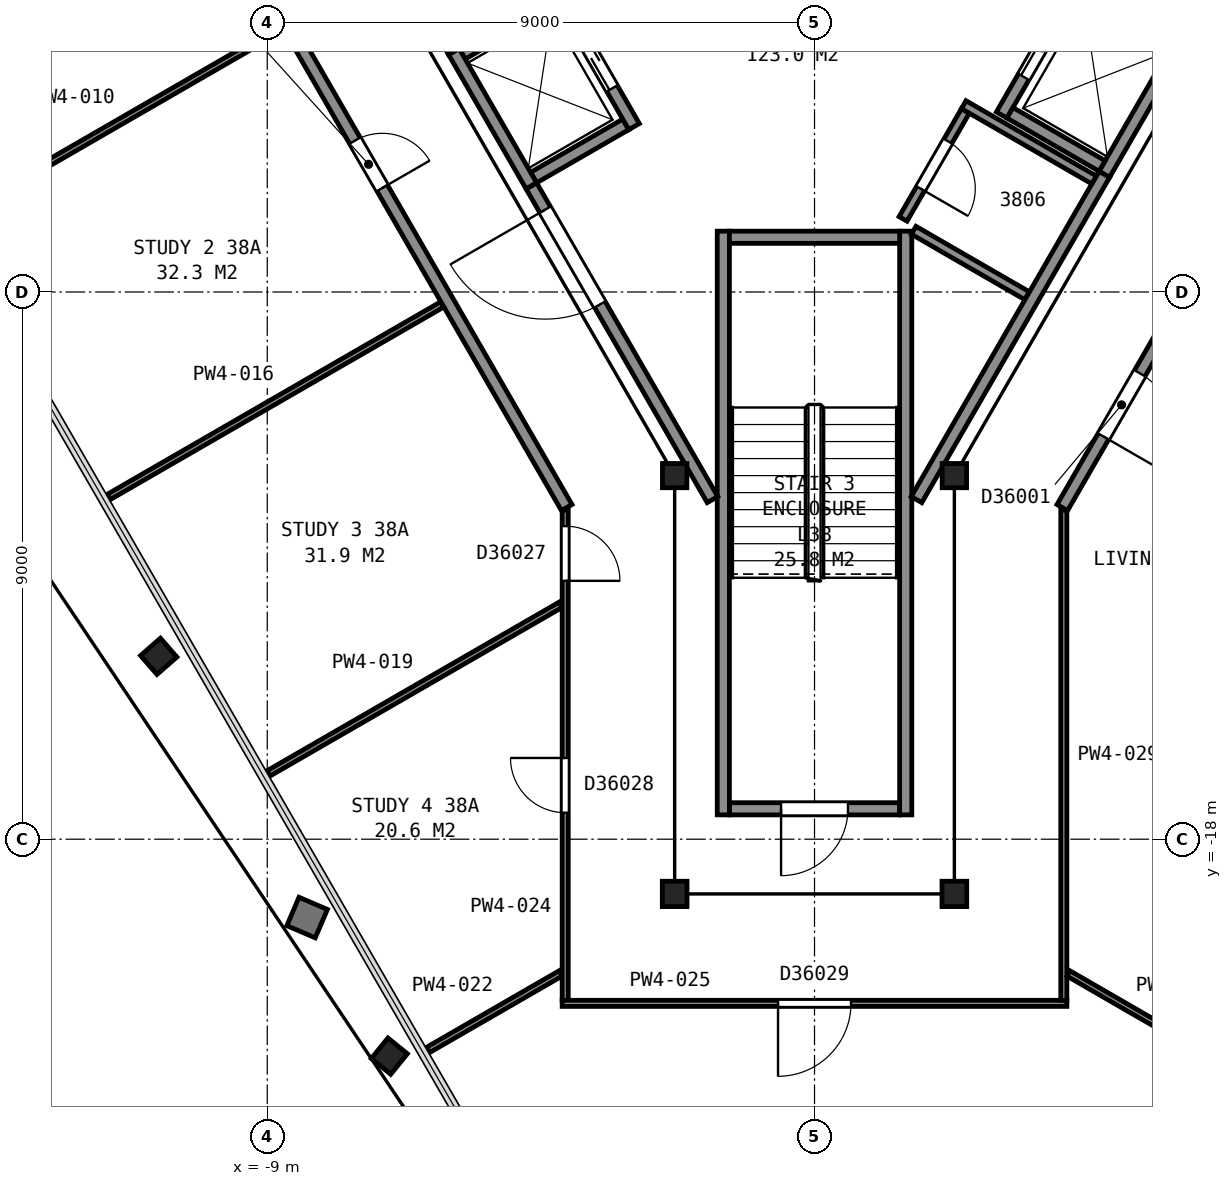
"""IFC4 building model, lengths in metres.
Left out: names, types, materials, properties, quantities, classifications, styles, units other than length and angle.
Written with IfcOpenShell. Run it as: python <this file> out.ifc"""

import sys

from ifc_helpers import new_model, si_unit, direction, frame, frame_2d, origin, origin_2d, place, context, subcontext, project, spatial, rectangle, i_section, extrude, element, fill, save


model = new_model("IFC4")
c1 = context("Model", 3, precision=1e-05, world=origin(), true_north=direction((0.0, 1.0)))
c2 = subcontext(c1, "Body", "Model", "MODEL_VIEW")
j1 = project(units=[si_unit("LENGTHUNIT", "METRE"), si_unit("PLANEANGLEUNIT", "RADIAN")], contexts=[c1])
p1 = place(None, origin())
s1 = spatial("IfcSite", under=j1, at=p1, CompositionType="ELEMENT")
p2 = place(p1, origin())
s2 = spatial("IfcBuilding", under=s1, at=p2, CompositionType="ELEMENT")
p3 = place(p2, frame((0.0, 0.0, 156.2)))
s3 = spatial("IfcBuildingStorey", under=s2, at=p3, CompositionType="ELEMENT", Elevation=156.2)
p4 = place(p3, frame((-10.615, -14.844, 0.035), z_axis=(-0.143357652075, -0.124736344896, 0.981778706152), x_axis=(-0.499529814587, 0.865505199982, 0.037023143348)))
e1 = element("IfcColumn", 1, at=p4, inside=s3, PredefinedType="COLUMN", context=c2, shape_type="SweptSolid", body=[
    extrude(i_section(OverallWidth=0.411, OverallDepth=0.434, WebThickness=0.036, FlangeThickness=0.057, FilletRadius=0.015, at=origin_2d()), origin(), (0.0, 0.0, 1.0), 3.697),
])
p5 = place(p3, frame((-6.845, -21.386, 0.04), z_axis=(-0.124482095085, -0.153635894306, 0.980255181054), x_axis=(-0.498752469691, 0.863745542287, 0.072038962763)))
e2 = element("IfcColumn", 2, at=p5, inside=s3, PredefinedType="COLUMN", context=c2, shape_type="SweptSolid", body=[
    extrude(i_section(OverallWidth=0.411, OverallDepth=0.434, WebThickness=0.036, FlangeThickness=0.057, FilletRadius=0.015, at=origin_2d()), origin(), (0.0, 0.0, 1.0), 3.693),
])
p6 = place(p3, frame((-2.3, -12.02, 0.0), z_axis=(0.0, 0.0, 1.0), x_axis=(1.0, 0.0, 0.0)))
e3 = element("IfcColumn", 3, at=p6, inside=s3, PredefinedType="COLUMN", context=c2, shape_type="SweptSolid", body=[
    extrude(i_section(OverallWidth=0.401, OverallDepth=0.399, WebThickness=0.025, FlangeThickness=0.04, FilletRadius=0.015, at=origin_2d()), origin(), (0.0, 0.0, 1.0), 3.7),
])
for number, where, z_axis, x_axis in (
    (4, (-2.3, -18.9, 0.0), (0.0, 0.0, 1.0), (-1.0, 0.0, 0.0)),
    (5, (2.3, -18.9, 0.0), (0.0, 0.0, 1.0), (-1.0, 0.0, 0.0)),
):
    element("IfcColumn", number, at=place(p3, frame(where, z_axis=z_axis, x_axis=x_axis)), inside=s3, PredefinedType="COLUMN", context=c2, shape_type="SweptSolid", body=[
        extrude(i_section(OverallWidth=0.406, OverallDepth=0.417, WebThickness=0.03, FlangeThickness=0.048, FilletRadius=0.015, at=origin_2d()), origin(), (0.0, 0.0, 1.0), 3.7),
    ])
p7 = place(p3, frame((2.3, -12.02, 0.0), z_axis=(0.0, 0.0, 1.0), x_axis=(1.0, 0.0, 0.0)))
e6 = element("IfcColumn", 6, at=p7, inside=s3, PredefinedType="COLUMN", context=c2, shape_type="SweptSolid", body=[
    extrude(i_section(OverallWidth=0.401, OverallDepth=0.399, WebThickness=0.025, FlangeThickness=0.04, FilletRadius=0.015, at=origin_2d()), origin(), (0.0, 0.0, 1.0), 3.7),
])
p8 = place(p3, frame((-1.4, -17.5, 0.0), z_axis=(0.0, 0.0, 1.0), x_axis=(1.0, 0.0, 0.0)))
e7 = element("IfcWall", 7, at=p8, inside=s3, PredefinedType="PARTITIONING", context=c2, shape_type="SweptSolid", body=[
    extrude(rectangle(XDim=2.8, YDim=0.2, at=frame_2d((1.4, 0.0))), origin(), (0.0, 0.0, 1.0), 3.45),
])
p9 = place(p8, frame((0.85, 0.0, 0.0)))
e8 = element("IfcOpeningElement", 8, at=p9, cuts=e7, PredefinedType="OPENING", context=c2, shape_type="SweptSolid", body=[
    extrude(rectangle(XDim=1.1, YDim=2.1, at=frame_2d((0.55, 1.05))), frame((0.0, 0.11, 0.0), z_axis=(0.0, -1.0, 0.0), x_axis=(1.0, 0.0, 0.0)), (0.0, 0.0, 1.0), 0.22),
])
for number, where, z_axis, x_axis in (
    (9, (1.5, -8.0, 0.0), (0.0, 0.0, 1.0), (0.0, -1.0, 0.0)),
    (10, (-1.5, -8.0, 0.0), (0.0, 0.0, 1.0), (0.0, -1.0, 0.0)),
):
    element("IfcWall", number, at=place(p3, frame(where, z_axis=z_axis, x_axis=x_axis)), inside=s3, PredefinedType="PARTITIONING", context=c2, shape_type="SweptSolid", body=[
        extrude(rectangle(XDim=9.6, YDim=0.2, at=frame_2d((4.8, 0.0))), origin(), (0.0, 0.0, 1.0), 3.45),
    ])
p10 = place(p3, frame((-1.4, -8.1, 0.0), z_axis=(0.0, 0.0, 1.0), x_axis=(1.0, 0.0, 0.0)))
e11 = element("IfcWall", 11, at=p10, inside=s3, PredefinedType="PARTITIONING", context=c2, shape_type="SweptSolid", body=[
    extrude(rectangle(XDim=2.8, YDim=0.2, at=frame_2d((1.4, 0.0))), origin(), (0.0, 0.0, 1.0), 3.45),
])
for number, where, z_axis, x_axis in (
    (12, (-4.62, -7.118, 0.0), (0.0, 0.0, 1.0), (0.866, 0.5, 0.0)),
    (13, (-5.795, -5.083, 0.0), (0.0, 0.0, 1.0), (0.866, 0.5, 0.0)),
):
    element("IfcWall", number, at=place(p3, frame(where, z_axis=z_axis, x_axis=x_axis)), inside=s3, PredefinedType="PARTITIONING", context=c2, shape_type="SweptSolid", body=[
        extrude(rectangle(XDim=1.75, YDim=0.2, at=frame_2d((0.875, 0.0))), origin(), (0.0, 0.0, 1.0), 3.7),
    ])
p11 = place(p3, frame((4.766, -7.065, 0.0), z_axis=(0.0, 0.0, 1.0), x_axis=(0.499948979701, 0.866054858364, 0.0)))
e14 = element("IfcWall", 14, at=p11, inside=s3, PredefinedType="PARTITIONING", context=c2, shape_type="SweptSolid", body=[
    extrude(rectangle(XDim=2.55, YDim=0.2, at=frame_2d((1.275, 0.0))), origin(), (0.0, 0.0, 1.0), 3.7),
])
p12 = place(p3, frame((3.077, -6.09, 0.0), z_axis=(0.0, 0.0, 1.0), x_axis=(0.500062241894, 0.865989465428, 0.0)))
e15 = element("IfcWall", 15, at=p12, inside=s3, PredefinedType="PARTITIONING", context=c2, shape_type="SweptSolid", body=[
    extrude(rectangle(XDim=2.55, YDim=0.2, at=frame_2d((1.275, 0.0))), origin(), (0.0, 0.0, 1.0), 3.7),
])
p13 = place(p12, frame((0.725, 0.0, 0.0)))
e16 = element("IfcOpeningElement", 16, at=p13, cuts=e15, PredefinedType="OPENING", context=c2, shape_type="SweptSolid", body=[
    extrude(rectangle(XDim=1.1, YDim=2.1, at=frame_2d((0.55, 1.05))), frame((0.0, 0.11, 0.0), z_axis=(0.0, -1.0, 0.0), x_axis=(1.0, 0.0, 0.0)), (0.0, 0.0, 1.0), 0.22),
])
p14 = place(p3, frame((-2.968, -6.28, 0.0), z_axis=(0.0, 0.0, 1.0), x_axis=(-0.499990435942, 0.866030925526, 0.0)))
e17 = element("IfcWall", 17, at=p14, inside=s3, PredefinedType="PARTITIONING", context=c2, shape_type="SweptSolid", body=[
    extrude(rectangle(XDim=2.55, YDim=0.2, at=frame_2d((1.275, 0.0))), origin(), (0.0, 0.0, 1.0), 3.7),
])
p15 = place(p14, frame((0.725, 0.0, 0.0)))
e18 = element("IfcOpeningElement", 18, at=p15, cuts=e17, PredefinedType="OPENING", context=c2, shape_type="SweptSolid", body=[
    extrude(rectangle(XDim=1.1, YDim=2.1, at=frame_2d((0.55, 1.05))), frame((0.0, 0.11, 0.0), z_axis=(0.0, -1.0, 0.0), x_axis=(1.0, 0.0, 0.0)), (0.0, 0.0, 1.0), 0.22),
])
p16 = place(p3, frame((-4.656, -7.255, 0.0), z_axis=(0.0, 0.0, 1.0), x_axis=(-0.499990435942, 0.866030925526, 0.0)))
e19 = element("IfcWall", 19, at=p16, inside=s3, PredefinedType="PARTITIONING", context=c2, shape_type="SweptSolid", body=[
    extrude(rectangle(XDim=2.55, YDim=0.2, at=frame_2d((1.275, 0.0))), origin(), (0.0, 0.0, 1.0), 3.7),
])
p17 = place(p3, frame((4.73, -6.928, 0.0), z_axis=(0.0, 0.0, 1.0), x_axis=(-0.866036909293, 0.499980071345, 0.0)))
e20 = element("IfcWall", 20, at=p17, inside=s3, PredefinedType="PARTITIONING", context=c2, shape_type="SweptSolid", body=[
    extrude(rectangle(XDim=1.75, YDim=0.2, at=frame_2d((0.875, 0.0))), origin(), (0.0, 0.0, 1.0), 3.7),
])
p18 = place(p3, frame((-7.005, -3.187, 0.0), z_axis=(0.0, 0.0, 1.0), x_axis=(0.499689606989, -0.866204535123, 0.0)))
e21 = element("IfcWall", 21, at=p18, inside=s3, PredefinedType="PARTITIONING", context=c2, shape_type="SweptSolid", body=[
    extrude(rectangle(XDim=2.145, YDim=0.2, at=frame_2d((1.072, 0.0))), origin(), (0.0, 0.0, 1.0), 3.45),
])
p19 = place(p3, frame((-4.655, -7.257, 0.0), z_axis=(0.0, 0.0, 1.0), x_axis=(0.499966124405, -0.866044960985, 0.0)))
e22 = element("IfcWall", 22, at=p19, inside=s3, PredefinedType="PARTITIONING", context=c2, shape_type="SweptSolid", body=[
    extrude(rectangle(XDim=5.956, YDim=0.2, at=frame_2d((2.978, 0.0))), origin(), (0.0, 0.0, 1.0), 3.45),
])
p20 = place(p19, frame((0.45, 0.0, 0.0)))
e23 = element("IfcOpeningElement", 23, at=p20, cuts=e22, PredefinedType="OPENING", context=c2, shape_type="SweptSolid", body=[
    extrude(rectangle(XDim=1.8, YDim=2.1, at=frame_2d((0.9, 1.05))), frame((0.0, 0.11, 0.0), z_axis=(0.0, -1.0, 0.0), x_axis=(1.0, 0.0, 0.0)), (0.0, 0.0, 1.0), 0.22),
])
p21 = place(p3, frame((2.481, -6.022, 0.0), z_axis=(0.0, 0.0, 1.0), x_axis=(-0.499801470403, -0.866139994564, 0.0)))
e24 = element("IfcWall", 24, at=p21, inside=s3, PredefinedType="PARTITIONING", context=c2, shape_type="SweptSolid", body=[
    extrude(rectangle(XDim=2.051, YDim=0.15, at=frame_2d((1.025, 0.0))), origin(), (0.0, 0.0, 1.0), 3.45),
])
p22 = place(p21, frame((0.576, 0.0, 0.0)))
e25 = element("IfcOpeningElement", 25, at=p22, cuts=e24, PredefinedType="OPENING", context=c2, shape_type="SweptSolid", body=[
    extrude(rectangle(XDim=0.9, YDim=2.1, at=frame_2d((0.45, 1.05))), frame((0.0, 0.085, 0.0), z_axis=(0.0, -1.0, 0.0), x_axis=(1.0, 0.0, 0.0)), (0.0, 0.0, 1.0), 0.17),
])
p23 = place(p3, frame((1.631, -7.986, 0.0), z_axis=(0.0, 0.0, 1.0), x_axis=(0.866038426532, -0.499977443261, 0.0)))
e26 = element("IfcWall", 26, at=p23, inside=s3, PredefinedType="PARTITIONING", context=c2, shape_type="SweptSolid", body=[
    extrude(rectangle(XDim=2.155, YDim=0.15, at=frame_2d((1.077, 0.0))), origin(), (0.0, 0.0, 1.0), 3.45),
])
p24 = place(p3, frame((1.677, -12.415, 0.0), z_axis=(0.0, 0.0, 1.0), x_axis=(0.500054337157, 0.865994029939, 0.0)))
e27 = element("IfcWall", 27, at=p24, inside=s3, PredefinedType="PARTITIONING", context=c2, shape_type="SweptSolid", body=[
    extrude(rectangle(XDim=6.177, YDim=0.2, at=frame_2d((3.088, 0.0))), origin(), (0.0, 0.0, 1.0), 3.45),
])
p25 = place(p3, frame((2.454, -5.919, 0.0), z_axis=(0.0, 0.0, 1.0), x_axis=(0.866006523861, -0.500032699561, 0.0)))
e28 = element("IfcWall", 28, at=p25, inside=s3, PredefinedType="PARTITIONING", context=c2, shape_type="SweptSolid", body=[
    extrude(rectangle(XDim=2.475, YDim=0.15, at=frame_2d((1.237, 0.0))), origin(), (0.0, 0.0, 1.0), 3.45),
])
p26 = place(p3, frame((-14.23, -7.823, 0.0), z_axis=(0.0, 0.0, 1.0), x_axis=(0.866021249958, 0.50000719457, 0.0)))
e29 = element("IfcWall", 29, at=p26, inside=s3, PredefinedType="PARTITIONING", context=c2, shape_type="SweptSolid", body=[
    extrude(rectangle(XDim=6.333, YDim=0.1, at=frame_2d((3.167, 0.0))), origin(), (0.0, 0.0, 1.0), 2.713),
])
p27 = place(p3, frame((-4.075, -12.545, 0.0), z_axis=(0.0, 0.0, 1.0), x_axis=(-0.499999743747, 0.866025551732, 0.0)))
e30 = element("IfcWall", 30, at=p27, inside=s3, PredefinedType="PARTITIONING", context=c2, shape_type="SweptSolid", body=[
    extrude(rectangle(XDim=17.656, YDim=0.2, at=frame_2d((8.828, 0.0))), origin(), (0.0, 0.0, 1.0), 2.713),
])
p28 = place(p27, frame((10.08, 0.0, 0.0)))
e31 = element("IfcOpeningElement", 31, at=p28, cuts=e30, PredefinedType="OPENING", context=c2, shape_type="SweptSolid", body=[
    extrude(rectangle(XDim=0.9, YDim=2.1, at=frame_2d((0.45, 1.05))), frame((0.0, 0.11, 0.0), z_axis=(0.0, -1.0, 0.0), x_axis=(1.0, 0.0, 0.0)), (0.0, 0.0, 1.0), 0.22),
])
p29 = place(p27, frame((6.068, 0.0, 0.0)))
e32 = element("IfcOpeningElement", 32, at=p29, cuts=e30, PredefinedType="OPENING", context=c2, shape_type="SweptSolid", body=[
    extrude(rectangle(XDim=0.9, YDim=2.1, at=frame_2d((0.45, 1.05))), frame((0.0, 0.11, 0.0), z_axis=(0.0, -1.0, 0.0), x_axis=(1.0, 0.0, 0.0)), (0.0, 0.0, 1.0), 0.22),
])
p30 = place(p3, frame((-11.605, -12.37, 0.0), z_axis=(0.0, 0.0, 1.0), x_axis=(0.866017278078, 0.500014073873, 0.0)))
e33 = element("IfcWall", 33, at=p30, inside=s3, PredefinedType="PARTITIONING", context=c2, shape_type="SweptSolid", body=[
    extrude(rectangle(XDim=6.329, YDim=0.1, at=frame_2d((3.165, 0.0))), origin(), (0.0, 0.0, 1.0), 2.713),
])
p31 = place(p3, frame((-8.979, -16.918, 0.0), z_axis=(0.0, 0.0, 1.0), x_axis=(0.866046339293, 0.499963736882, 0.0)))
e34 = element("IfcWall", 34, at=p31, inside=s3, PredefinedType="PARTITIONING", context=c2, shape_type="SweptSolid", body=[
    extrude(rectangle(XDim=5.547, YDim=0.1, at=frame_2d((2.774, 0.0))), origin(), (0.0, 0.0, 1.0), 2.713),
])
p32 = place(p3, frame((-6.354, -21.465, 0.0), z_axis=(0.0, 0.0, 1.0), x_axis=(0.866061165757, 0.499938053331, 0.0)))
e35 = element("IfcWall", 35, at=p32, inside=s3, PredefinedType="PARTITIONING", context=c2, shape_type="SweptSolid", body=[
    extrude(rectangle(XDim=2.516, YDim=0.1, at=frame_2d((1.258, 0.0))), origin(), (0.0, 0.0, 1.0), 2.713),
])
p33 = place(p3, frame((-4.1, -20.65, 0.0), z_axis=(0.0, 0.0, 1.0), x_axis=(0.0, 1.0, 0.0)))
e36 = element("IfcWall", 36, at=p33, inside=s3, PredefinedType="PARTITIONING", context=c2, shape_type="SweptSolid", body=[
    extrude(rectangle(XDim=8.063, YDim=0.1, at=frame_2d((4.031, 0.0))), origin(), (0.0, 0.0, 1.0), 2.713),
])
p34 = place(p33, frame((6.899, 0.0, 0.0)))
e37 = element("IfcOpeningElement", 37, at=p34, cuts=e36, PredefinedType="OPENING", context=c2, shape_type="SweptSolid", body=[
    extrude(rectangle(XDim=0.9, YDim=2.1, at=frame_2d((0.45, 1.05))), frame((0.0, 0.06, 0.0), z_axis=(0.0, -1.0, 0.0), x_axis=(1.0, 0.0, 0.0)), (0.0, 0.0, 1.0), 0.12),
])
p35 = place(p33, frame((3.086, 0.0, 0.0)))
e38 = element("IfcOpeningElement", 38, at=p35, cuts=e36, PredefinedType="OPENING", context=c2, shape_type="SweptSolid", body=[
    extrude(rectangle(XDim=0.9, YDim=2.1, at=frame_2d((0.45, 1.05))), frame((0.0, 0.06, 0.0), z_axis=(0.0, -1.0, 0.0), x_axis=(1.0, 0.0, 0.0)), (0.0, 0.0, 1.0), 0.12),
])
p36 = place(p3, frame((4.15, -20.7, 0.0), z_axis=(0.0, 0.0, 1.0), x_axis=(-1.0, 0.0, 0.0)))
e39 = element("IfcWall", 39, at=p36, inside=s3, PredefinedType="PARTITIONING", context=c2, shape_type="SweptSolid", body=[
    extrude(rectangle(XDim=8.3, YDim=0.1, at=frame_2d((4.15, 0.0))), origin(), (0.0, 0.0, 1.0), 2.713),
])
p37 = place(p36, frame((3.55, 0.0, 0.0)))
e40 = element("IfcOpeningElement", 40, at=p37, cuts=e39, PredefinedType="OPENING", context=c2, shape_type="SweptSolid", body=[
    extrude(rectangle(XDim=1.2, YDim=2.1, at=frame_2d((0.6, 1.05))), frame((0.0, 0.06, 0.0), z_axis=(0.0, -1.0, 0.0), x_axis=(1.0, 0.0, 0.0)), (0.0, 0.0, 1.0), 0.12),
])
p38 = place(p3, frame((4.1, -20.65, 0.0), z_axis=(0.0, 0.0, 1.0), x_axis=(0.0, 1.0, 0.0)))
e41 = element("IfcWall", 41, at=p38, inside=s3, PredefinedType="PARTITIONING", context=c2, shape_type="SweptSolid", body=[
    extrude(rectangle(XDim=8.063, YDim=0.1, at=frame_2d((4.031, 0.0))), origin(), (0.0, 0.0, 1.0), 2.713),
])
p39 = place(p3, frame((4.175, -20.207, 0.0), z_axis=(0.0, 0.0, 1.0), x_axis=(0.866061165757, -0.499938053331, 0.0)))
e42 = element("IfcWall", 42, at=p39, inside=s3, PredefinedType="PARTITIONING", context=c2, shape_type="SweptSolid", body=[
    extrude(rectangle(XDim=2.516, YDim=0.1, at=frame_2d((1.258, 0.0))), origin(), (0.0, 0.0, 1.0), 2.713),
])
p40 = place(p3, frame((12.928, 2.789, 0.0), z_axis=(0.0, 0.0, 1.0), x_axis=(-0.499997769292, -0.86602669168, 0.0)))
e43 = element("IfcWall", 43, at=p40, inside=s3, PredefinedType="PARTITIONING", context=c2, shape_type="SweptSolid", body=[
    extrude(rectangle(XDim=17.706, YDim=0.2, at=frame_2d((8.853, 0.0))), origin(), (0.0, 0.0, 1.0), 2.713),
])
p41 = place(p40, frame((15.156, 0.0, 0.0)))
e44 = element("IfcOpeningElement", 44, at=p41, cuts=e43, PredefinedType="OPENING", context=c2, shape_type="SweptSolid", body=[
    extrude(rectangle(XDim=1.2, YDim=2.1, at=frame_2d((0.6, 1.05))), frame((0.0, 0.11, 0.0), z_axis=(0.0, -1.0, 0.0), x_axis=(1.0, 0.0, 0.0)), (0.0, 0.0, 1.0), 0.22),
])
p42 = place(p40, frame((11.042, 0.0, 0.0)))
e45 = element("IfcOpeningElement", 45, at=p42, cuts=e43, PredefinedType="OPENING", context=c2, shape_type="SweptSolid", body=[
    extrude(rectangle(XDim=0.9, YDim=2.1, at=frame_2d((0.45, 1.05))), frame((0.0, 0.11, 0.0), z_axis=(0.0, -1.0, 0.0), x_axis=(1.0, 0.0, 0.0)), (0.0, 0.0, 1.0), 0.22),
])
p43 = place(p40, frame((7.14, 0.0, 0.0)))
e46 = element("IfcOpeningElement", 46, at=p43, cuts=e43, PredefinedType="OPENING", context=c2, shape_type="SweptSolid", body=[
    extrude(rectangle(XDim=0.9, YDim=2.1, at=frame_2d((0.45, 1.05))), frame((0.0, 0.11, 0.0), z_axis=(0.0, -1.0, 0.0), x_axis=(1.0, 0.0, 0.0)), (0.0, 0.0, 1.0), 0.22),
])
p44 = place(p40, frame((0.515, 0.0, 0.0)))
e47 = element("IfcOpeningElement", 47, at=p44, cuts=e43, PredefinedType="OPENING", context=c2, shape_type="SweptSolid", body=[
    extrude(rectangle(XDim=0.9, YDim=2.1, at=frame_2d((0.45, 1.05))), frame((0.0, 0.11, 0.0), z_axis=(0.0, -1.0, 0.0), x_axis=(1.0, 0.0, 0.0)), (0.0, 0.0, 1.0), 0.22),
])
p45 = place(p9, origin())
e48 = element("IfcDoor", 48, at=p45, inside=s3, OperationType="SINGLE_SWING_LEFT", PredefinedType="DOOR", context=c2, shape_type="SweptSolid", body=[
    extrude(rectangle(XDim=1.1, YDim=2.1, at=frame_2d((0.55, 1.05))), frame((0.0, 0.025, 0.0), z_axis=(0.0, -1.0, 0.0), x_axis=(1.0, 0.0, 0.0)), (0.0, 0.0, 1.0), 0.05),
])
fill(e8, e48)
p46 = place(p13, origin())
e49 = element("IfcDoor", 49, at=p46, inside=s3, OperationType="SLIDING_TO_LEFT", PredefinedType="DOOR", context=c2, shape_type="SweptSolid", body=[
    extrude(rectangle(XDim=1.1, YDim=2.1, at=frame_2d((0.55, 1.05))), frame((0.0, 0.025, 0.0), z_axis=(0.0, -1.0, 0.0), x_axis=(1.0, 0.0, 0.0)), (0.0, 0.0, 1.0), 0.05),
])
fill(e16, e49)
p47 = place(p15, origin())
e50 = element("IfcDoor", 50, at=p47, inside=s3, OperationType="SLIDING_TO_RIGHT", PredefinedType="DOOR", context=c2, shape_type="SweptSolid", body=[
    extrude(rectangle(XDim=1.1, YDim=2.1, at=frame_2d((0.55, 1.05))), frame((0.0, 0.025, 0.0), z_axis=(0.0, -1.0, 0.0), x_axis=(1.0, 0.0, 0.0)), (0.0, 0.0, 1.0), 0.05),
])
fill(e18, e50)
p48 = place(p20, origin())
e51 = element("IfcDoor", 51, at=p48, inside=s3, OperationType="DOUBLE_DOOR_SINGLE_SWING", PredefinedType="DOOR", context=c2, shape_type="SweptSolid", body=[
    extrude(rectangle(XDim=1.8, YDim=2.1, at=frame_2d((0.9, 1.05))), frame((0.0, 0.025, 0.0), z_axis=(0.0, -1.0, 0.0), x_axis=(1.0, 0.0, 0.0)), (0.0, 0.0, 1.0), 0.05),
])
fill(e23, e51)
p49 = place(p22, origin())
e52 = element("IfcDoor", 52, at=p49, inside=s3, OperationType="SINGLE_SWING_RIGHT", PredefinedType="DOOR", context=c2, shape_type="SweptSolid", body=[
    extrude(rectangle(XDim=0.9, YDim=2.1, at=frame_2d((0.45, 1.05))), frame((0.0, 0.025, 0.0), z_axis=(0.0, -1.0, 0.0), x_axis=(1.0, 0.0, 0.0)), (0.0, 0.0, 1.0), 0.05),
])
fill(e25, e52)
p50 = place(p29, origin())
e53 = element("IfcDoor", 53, at=p50, inside=s3, OperationType="SINGLE_SWING_LEFT", PredefinedType="DOOR", context=c2, shape_type="SweptSolid", body=[
    extrude(rectangle(XDim=0.9, YDim=2.1, at=frame_2d((0.45, 1.05))), frame((0.0, 0.025, 0.0), z_axis=(0.0, -1.0, 0.0), x_axis=(1.0, 0.0, 0.0)), (0.0, 0.0, 1.0), 0.05),
])
fill(e32, e53)
p51 = place(p34, origin())
e54 = element("IfcDoor", 54, at=p51, inside=s3, OperationType="SINGLE_SWING_LEFT", PredefinedType="DOOR", context=c2, shape_type="SweptSolid", body=[
    extrude(rectangle(XDim=0.9, YDim=2.1, at=frame_2d((0.45, 1.05))), frame((0.0, 0.025, 0.0), z_axis=(0.0, -1.0, 0.0), x_axis=(1.0, 0.0, 0.0)), (0.0, 0.0, 1.0), 0.05),
])
fill(e37, e54)
p52 = place(p35, origin())
e55 = element("IfcDoor", 55, at=p52, inside=s3, OperationType="SINGLE_SWING_RIGHT", PredefinedType="DOOR", context=c2, shape_type="SweptSolid", body=[
    extrude(rectangle(XDim=0.9, YDim=2.1, at=frame_2d((0.45, 1.05))), frame((0.0, 0.025, 0.0), z_axis=(0.0, -1.0, 0.0), x_axis=(1.0, 0.0, 0.0)), (0.0, 0.0, 1.0), 0.05),
])
fill(e38, e55)
p53 = place(p37, origin())
e56 = element("IfcDoor", 56, at=p53, inside=s3, OperationType="SINGLE_SWING_RIGHT", PredefinedType="DOOR", context=c2, shape_type="SweptSolid", body=[
    extrude(rectangle(XDim=1.2, YDim=2.1, at=frame_2d((0.6, 1.05))), frame((0.0, 0.025, 0.0), z_axis=(0.0, -1.0, 0.0), x_axis=(1.0, 0.0, 0.0)), (0.0, 0.0, 1.0), 0.05),
])
fill(e40, e56)
p54 = place(p41, origin())
e57 = element("IfcDoor", 57, at=p54, inside=s3, OperationType="SINGLE_SWING_RIGHT", PredefinedType="DOOR", context=c2, shape_type="SweptSolid", body=[
    extrude(rectangle(XDim=1.2, YDim=2.1, at=frame_2d((0.6, 1.05))), frame((0.0, 0.025, 0.0), z_axis=(0.0, -1.0, 0.0), x_axis=(1.0, 0.0, 0.0)), (0.0, 0.0, 1.0), 0.05),
])
fill(e44, e57)
save(model, sys.argv[1])
